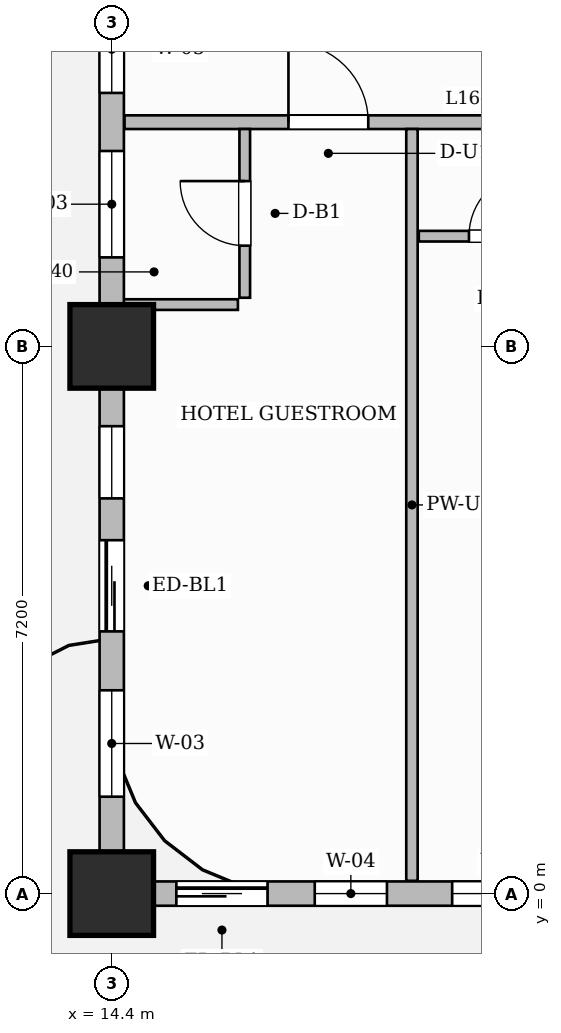
"""IFC4 building model, lengths in metres.
Left out: names, types, materials, properties, quantities, classifications, styles, units other than length and angle.
Written with IfcOpenShell. Run it as: python <this file> out.ifc"""

import sys

from ifc_helpers import new_model, si_unit, direction, frame, frame_2d, origin, origin_2d, place, context, subcontext, project, spatial, rectangle, extrude, source, transform, mapped, element, fill, save


model = new_model("IFC4")
c1 = context("Model", 3, precision=1e-05, world=origin(), true_north=direction((0.0, 1.0)))
c2 = subcontext(c1, "Body", "Model", "MODEL_VIEW")
j1 = project(units=[si_unit("LENGTHUNIT", "METRE"), si_unit("PLANEANGLEUNIT", "RADIAN")], contexts=[c1])
p1 = place(None, origin())
s1 = spatial("IfcSite", under=j1, at=p1, CompositionType="ELEMENT")
p2 = place(p1, origin())
s2 = spatial("IfcBuilding", under=s1, at=p2, CompositionType="ELEMENT")
p3 = place(p2, frame((0.0, 0.0, 69.4)))
s3 = spatial("IfcBuildingStorey", under=s2, at=p3, CompositionType="ELEMENT", Elevation=69.4)
m1 = source(origin(), c2, "Body", "SweptSolid", [
    extrude(rectangle(XDim=1.1, YDim=1.1, at=origin_2d()), origin(), (0.0, 0.0, 1.0), 3.7),
])
for number, where, z_axis, x_axis in (
    (1, (14.4, 0.0, 0.0), (0.0, 0.0, 1.0), (1.0, 0.0, 0.0)),
    (2, (14.4, 7.2, 0.0), (0.0, 0.0, 1.0), (1.0, 0.0, 0.0)),
):
    element("IfcColumn", number, at=place(p3, frame(where, z_axis=z_axis, x_axis=x_axis)), inside=s3, PredefinedType="COLUMN", context=c2, shape_type="MappedRepresentation", body=[
        mapped(m1, transform((0.0, 0.0, 0.0), scale=1.0)),
    ])
p4 = place(p3, frame((14.568, 10.15, 0.0), z_axis=(0.0, 0.0, 1.0), x_axis=(1.0, 0.0, 0.0)))
e3 = element("IfcWall", 3, at=p4, inside=s3, PredefinedType="PARTITIONING", context=c2, shape_type="SweptSolid", body=[
    extrude(rectangle(XDim=15.542, YDim=0.18, at=frame_2d((7.771, 0.0))), origin(), (0.0, 0.0, 1.0), 3.45),
])
p5 = place(p4, frame((2.157, 0.0, 0.0)))
e4 = element("IfcOpeningElement", 4, at=p5, cuts=e3, PredefinedType="OPENING", context=c2, shape_type="SweptSolid", body=[
    extrude(rectangle(XDim=1.05, YDim=2.25, at=frame_2d((0.525, 1.125))), frame((0.0, 0.1, 0.0), z_axis=(0.0, -1.0, 0.0), x_axis=(1.0, 0.0, 0.0)), (0.0, 0.0, 1.0), 0.2),
])
p6 = place(p4, frame((7.142, 0.0, 0.0)))
e5 = element("IfcOpeningElement", 5, at=p6, cuts=e3, PredefinedType="OPENING", context=c2, shape_type="SweptSolid", body=[
    extrude(rectangle(XDim=1.0, YDim=2.2, at=frame_2d((0.5, 1.1))), frame((0.0, 0.1, 0.0), z_axis=(0.0, -1.0, 0.0), x_axis=(1.0, 0.0, 0.0)), (0.0, 0.0, 1.0), 0.2),
])
p7 = place(p4, frame((10.987, 0.0, 0.0)))
e6 = element("IfcOpeningElement", 6, at=p7, cuts=e3, PredefinedType="OPENING", context=c2, shape_type="SweptSolid", body=[
    extrude(rectangle(XDim=1.05, YDim=2.25, at=frame_2d((0.525, 1.125))), frame((0.0, 0.1, 0.0), z_axis=(0.0, -1.0, 0.0), x_axis=(1.0, 0.0, 0.0)), (0.0, 0.0, 1.0), 0.2),
])
p8 = place(p4, frame((14.402, 0.0, 0.0)))
e7 = element("IfcOpeningElement", 7, at=p8, cuts=e3, PredefinedType="OPENING", context=c2, shape_type="SweptSolid", body=[
    extrude(rectangle(XDim=1.0, YDim=2.2, at=frame_2d((0.5, 1.1))), frame((0.0, 0.1, 0.0), z_axis=(0.0, -1.0, 0.0), x_axis=(1.0, 0.0, 0.0)), (0.0, 0.0, 1.0), 0.2),
])
p9 = place(p3, frame((16.15, 7.84, 0.0), z_axis=(0.0, 0.0, 1.0), x_axis=(0.0, 1.0, 0.0)))
e8 = element("IfcWall", 8, at=p9, inside=s3, PredefinedType="PARTITIONING", context=c2, shape_type="SweptSolid", body=[
    extrude(rectangle(XDim=2.22, YDim=0.14, at=frame_2d((1.11, 0.0))), origin(), (0.0, 0.0, 1.0), 3.45),
])
p10 = place(p9, frame((0.685, 0.0, 0.0)))
e9 = element("IfcOpeningElement", 9, at=p10, cuts=e8, PredefinedType="OPENING", context=c2, shape_type="SweptSolid", body=[
    extrude(rectangle(XDim=0.85, YDim=2.1, at=frame_2d((0.425, 1.05))), frame((0.0, 0.08, 0.0), z_axis=(0.0, -1.0, 0.0), x_axis=(1.0, 0.0, 0.0)), (0.0, 0.0, 1.0), 0.16),
])
p11 = place(p3, frame((14.49, 7.75, 0.0), z_axis=(0.0, 0.0, 1.0), x_axis=(1.0, 0.0, 0.0)))
e10 = element("IfcWall", 10, at=p11, inside=s3, PredefinedType="PARTITIONING", context=c2, shape_type="SweptSolid", body=[
    extrude(rectangle(XDim=1.57, YDim=0.14, at=frame_2d((0.785, 0.0))), origin(), (0.0, 0.0, 1.0), 3.45),
])
p12 = place(p3, frame((18.35, 0.168, 0.0), z_axis=(0.0, 0.0, 1.0), x_axis=(0.0, 1.0, 0.0)))
e11 = element("IfcWall", 11, at=p12, inside=s3, PredefinedType="PARTITIONING", context=c2, shape_type="SweptSolid", body=[
    extrude(rectangle(XDim=9.892, YDim=0.15, at=frame_2d((4.946, 0.0))), origin(), (0.0, 0.0, 1.0), 3.45),
])
p13 = place(p3, frame((18.44, 8.65, 0.0), z_axis=(0.0, 0.0, 1.0), x_axis=(1.0, 0.0, 0.0)))
e12 = element("IfcWall", 12, at=p13, inside=s3, PredefinedType="PARTITIONING", context=c2, shape_type="SweptSolid", body=[
    extrude(rectangle(XDim=2.17, YDim=0.14, at=frame_2d((1.085, 0.0))), origin(), (0.0, 0.0, 1.0), 3.45),
])
p14 = place(p13, frame((0.66, 0.0, 0.0)))
e13 = element("IfcOpeningElement", 13, at=p14, cuts=e12, PredefinedType="OPENING", context=c2, shape_type="SweptSolid", body=[
    extrude(rectangle(XDim=0.85, YDim=2.1, at=frame_2d((0.425, 1.05))), frame((0.0, 0.08, 0.0), z_axis=(0.0, -1.0, 0.0), x_axis=(1.0, 0.0, 0.0)), (0.0, 0.0, 1.0), 0.16),
])
p15 = place(p3, frame((14.4, 0.0, 0.0), z_axis=(0.0, 0.0, 1.0), x_axis=(1.0, 0.0, 0.0)))
e14 = element("IfcWall", 14, at=p15, inside=s3, PredefinedType="SOLIDWALL", context=c2, shape_type="SweptSolid", body=[
    extrude(rectangle(XDim=43.2, YDim=0.32, at=frame_2d((21.6, 0.0))), origin(), (0.0, 0.0, 1.0), 2.885),
])
p16 = place(p15, frame((0.85, 0.0, 0.0)))
e15 = element("IfcOpeningElement", 15, at=p16, cuts=e14, PredefinedType="OPENING", context=c2, shape_type="SweptSolid", body=[
    extrude(rectangle(XDim=1.2, YDim=2.2, at=frame_2d((0.6, 1.1))), frame((0.0, 0.17, 0.0), z_axis=(0.0, -1.0, 0.0), x_axis=(1.0, 0.0, 0.0)), (0.0, 0.0, 1.0), 0.34),
])
p17 = place(p15, frame((2.671, 0.0, 0.8)))
e16 = element("IfcOpeningElement", 16, at=p17, cuts=e14, PredefinedType="OPENING", context=c2, shape_type="SweptSolid", body=[
    extrude(rectangle(XDim=0.95, YDim=1.75, at=frame_2d((0.475, 0.875))), frame((0.0, 0.17, 0.0), z_axis=(0.0, -1.0, 0.0), x_axis=(1.0, 0.0, 0.0)), (0.0, 0.0, 1.0), 0.34),
])
p18 = place(p15, frame((4.479, 0.0, 0.8)))
e17 = element("IfcOpeningElement", 17, at=p18, cuts=e14, PredefinedType="OPENING", context=c2, shape_type="SweptSolid", body=[
    extrude(rectangle(XDim=1.4, YDim=1.85, at=frame_2d((0.7, 0.925))), frame((0.0, 0.17, 0.0), z_axis=(0.0, -1.0, 0.0), x_axis=(1.0, 0.0, 0.0)), (0.0, 0.0, 1.0), 0.34),
])
p19 = place(p15, frame((8.181, 0.0, 0.8)))
e18 = element("IfcOpeningElement", 18, at=p19, cuts=e14, PredefinedType="OPENING", context=c2, shape_type="SweptSolid", body=[
    extrude(rectangle(XDim=0.95, YDim=1.75, at=frame_2d((0.475, 0.875))), frame((0.0, 0.17, 0.0), z_axis=(0.0, -1.0, 0.0), x_axis=(1.0, 0.0, 0.0)), (0.0, 0.0, 1.0), 0.34),
])
p20 = place(p15, frame((9.845, 0.0, 0.8)))
e19 = element("IfcOpeningElement", 19, at=p20, cuts=e14, PredefinedType="OPENING", context=c2, shape_type="SweptSolid", body=[
    extrude(rectangle(XDim=1.8, YDim=1.85, at=frame_2d((0.9, 0.925))), frame((0.0, 0.17, 0.0), z_axis=(0.0, -1.0, 0.0), x_axis=(1.0, 0.0, 0.0)), (0.0, 0.0, 1.0), 0.34),
])
p21 = place(p15, frame((12.414, 0.0, 0.8)))
e20 = element("IfcOpeningElement", 20, at=p21, cuts=e14, PredefinedType="OPENING", context=c2, shape_type="SweptSolid", body=[
    extrude(rectangle(XDim=0.95, YDim=1.75, at=frame_2d((0.475, 0.875))), frame((0.0, 0.17, 0.0), z_axis=(0.0, -1.0, 0.0), x_axis=(1.0, 0.0, 0.0)), (0.0, 0.0, 1.0), 0.34),
])
p22 = place(p15, frame((16.804, 0.0, 0.8)))
e21 = element("IfcOpeningElement", 21, at=p22, cuts=e14, PredefinedType="OPENING", context=c2, shape_type="SweptSolid", body=[
    extrude(rectangle(XDim=1.8, YDim=1.85, at=frame_2d((0.9, 0.925))), frame((0.0, 0.17, 0.0), z_axis=(0.0, -1.0, 0.0), x_axis=(1.0, 0.0, 0.0)), (0.0, 0.0, 1.0), 0.34),
])
p23 = place(p15, frame((22.396, 0.0, 0.8)))
e22 = element("IfcOpeningElement", 22, at=p23, cuts=e14, PredefinedType="OPENING", context=c2, shape_type="SweptSolid", body=[
    extrude(rectangle(XDim=1.8, YDim=1.85, at=frame_2d((0.9, 0.925))), frame((0.0, 0.17, 0.0), z_axis=(0.0, -1.0, 0.0), x_axis=(1.0, 0.0, 0.0)), (0.0, 0.0, 1.0), 0.34),
])
p24 = place(p15, frame((25.629, 0.0, 0.8)))
e23 = element("IfcOpeningElement", 23, at=p24, cuts=e14, PredefinedType="OPENING", context=c2, shape_type="SweptSolid", body=[
    extrude(rectangle(XDim=0.95, YDim=1.75, at=frame_2d((0.475, 0.875))), frame((0.0, 0.17, 0.0), z_axis=(0.0, -1.0, 0.0), x_axis=(1.0, 0.0, 0.0)), (0.0, 0.0, 1.0), 0.34),
])
p25 = place(p15, frame((29.075, 0.0, 0.8)))
e24 = element("IfcOpeningElement", 24, at=p25, cuts=e14, PredefinedType="OPENING", context=c2, shape_type="SweptSolid", body=[
    extrude(rectangle(XDim=1.8, YDim=1.85, at=frame_2d((0.9, 0.925))), frame((0.0, 0.17, 0.0), z_axis=(0.0, -1.0, 0.0), x_axis=(1.0, 0.0, 0.0)), (0.0, 0.0, 1.0), 0.34),
])
p26 = place(p15, frame((32.125, 0.0, 0.8)))
e25 = element("IfcOpeningElement", 25, at=p26, cuts=e14, PredefinedType="OPENING", context=c2, shape_type="SweptSolid", body=[
    extrude(rectangle(XDim=1.8, YDim=1.85, at=frame_2d((0.9, 0.925))), frame((0.0, 0.17, 0.0), z_axis=(0.0, -1.0, 0.0), x_axis=(1.0, 0.0, 0.0)), (0.0, 0.0, 1.0), 0.34),
])
p27 = place(p15, frame((36.946, 0.0, 0.8)))
e26 = element("IfcOpeningElement", 26, at=p27, cuts=e14, PredefinedType="OPENING", context=c2, shape_type="SweptSolid", body=[
    extrude(rectangle(XDim=1.8, YDim=1.85, at=frame_2d((0.9, 0.925))), frame((0.0, 0.17, 0.0), z_axis=(0.0, -1.0, 0.0), x_axis=(1.0, 0.0, 0.0)), (0.0, 0.0, 1.0), 0.34),
])
p28 = place(p15, frame((40.054, 0.0, 0.8)))
e27 = element("IfcOpeningElement", 27, at=p28, cuts=e14, PredefinedType="OPENING", context=c2, shape_type="SweptSolid", body=[
    extrude(rectangle(XDim=1.8, YDim=1.85, at=frame_2d((0.9, 0.925))), frame((0.0, 0.17, 0.0), z_axis=(0.0, -1.0, 0.0), x_axis=(1.0, 0.0, 0.0)), (0.0, 0.0, 1.0), 0.34),
])
p29 = place(p3, frame((14.4, 0.05, 0.0), z_axis=(0.0, 0.0, 1.0), x_axis=(0.0, 1.0, 0.0)))
e28 = element("IfcWall", 28, at=p29, inside=s3, PredefinedType="SOLIDWALL", context=c2, shape_type="SweptSolid", body=[
    extrude(rectangle(XDim=20.6, YDim=0.32, at=frame_2d((10.3, 0.0))), origin(), (0.0, 0.0, 1.0), 2.885),
])
p30 = place(p29, frame((3.4, 0.0, 0.0)))
e29 = element("IfcOpeningElement", 29, at=p30, cuts=e28, PredefinedType="OPENING", context=c2, shape_type="SweptSolid", body=[
    extrude(rectangle(XDim=1.2, YDim=2.2, at=frame_2d((0.6, 1.1))), frame((0.0, 0.17, 0.0), z_axis=(0.0, -1.0, 0.0), x_axis=(1.0, 0.0, 0.0)), (0.0, 0.0, 1.0), 0.34),
])
p31 = place(p29, frame((1.225, 0.0, 0.8)))
e30 = element("IfcOpeningElement", 30, at=p31, cuts=e28, PredefinedType="OPENING", context=c2, shape_type="SweptSolid", body=[
    extrude(rectangle(XDim=1.4, YDim=1.85, at=frame_2d((0.7, 0.925))), frame((0.0, 0.17, 0.0), z_axis=(0.0, -1.0, 0.0), x_axis=(1.0, 0.0, 0.0)), (0.0, 0.0, 1.0), 0.34),
])
p32 = place(p29, frame((5.15, 0.0, 0.8)))
e31 = element("IfcOpeningElement", 31, at=p32, cuts=e28, PredefinedType="OPENING", context=c2, shape_type="SweptSolid", body=[
    extrude(rectangle(XDim=0.95, YDim=1.75, at=frame_2d((0.475, 0.875))), frame((0.0, 0.17, 0.0), z_axis=(0.0, -1.0, 0.0), x_axis=(1.0, 0.0, 0.0)), (0.0, 0.0, 1.0), 0.34),
])
p33 = place(p29, frame((8.321, 0.0, 0.8)))
e32 = element("IfcOpeningElement", 32, at=p33, cuts=e28, PredefinedType="OPENING", context=c2, shape_type="SweptSolid", body=[
    extrude(rectangle(XDim=1.4, YDim=1.85, at=frame_2d((0.7, 0.925))), frame((0.0, 0.17, 0.0), z_axis=(0.0, -1.0, 0.0), x_axis=(1.0, 0.0, 0.0)), (0.0, 0.0, 1.0), 0.34),
])
p34 = place(p29, frame((10.485, 0.0, 0.8)))
e33 = element("IfcOpeningElement", 33, at=p34, cuts=e28, PredefinedType="OPENING", context=c2, shape_type="SweptSolid", body=[
    extrude(rectangle(XDim=1.15, YDim=1.8, at=frame_2d((0.575, 0.9))), frame((0.0, 0.17, 0.0), z_axis=(0.0, -1.0, 0.0), x_axis=(1.0, 0.0, 0.0)), (0.0, 0.0, 1.0), 0.34),
])
p35 = place(p29, frame((12.314, 0.0, 0.8)))
e34 = element("IfcOpeningElement", 34, at=p35, cuts=e28, PredefinedType="OPENING", context=c2, shape_type="SweptSolid", body=[
    extrude(rectangle(XDim=0.95, YDim=1.75, at=frame_2d((0.475, 0.875))), frame((0.0, 0.17, 0.0), z_axis=(0.0, -1.0, 0.0), x_axis=(1.0, 0.0, 0.0)), (0.0, 0.0, 1.0), 0.34),
])
p36 = place(p29, frame((16.79, 0.0, 0.8)))
e35 = element("IfcOpeningElement", 35, at=p36, cuts=e28, PredefinedType="OPENING", context=c2, shape_type="SweptSolid", body=[
    extrude(rectangle(XDim=1.8, YDim=1.85, at=frame_2d((0.9, 0.925))), frame((0.0, 0.17, 0.0), z_axis=(0.0, -1.0, 0.0), x_axis=(1.0, 0.0, 0.0)), (0.0, 0.0, 1.0), 0.34),
])
m2 = source(origin(), c2, "Body", "SweptSolid", [
    extrude(rectangle(XDim=0.85, YDim=2.1, at=frame_2d((0.425, 1.05))), frame((0.0, 0.025, 0.0), z_axis=(0.0, -1.0, 0.0), x_axis=(1.0, 0.0, 0.0)), (0.0, 0.0, 1.0), 0.05),
])
p37 = place(p10, origin())
e36 = element("IfcDoor", 36, at=p37, inside=s3, OperationType="SINGLE_SWING_RIGHT", PredefinedType="DOOR", context=c2, shape_type="MappedRepresentation", body=[
    mapped(m2, transform((0.0, 0.0, 0.0), scale=1.0)),
])
fill(e9, e36)
m3 = source(origin(), c2, "Body", "SweptSolid", [
    extrude(rectangle(XDim=1.05, YDim=2.25, at=frame_2d((0.525, 1.125))), frame((0.0, 0.025, 0.0), z_axis=(0.0, -1.0, 0.0), x_axis=(1.0, 0.0, 0.0)), (0.0, 0.0, 1.0), 0.05),
])
p38 = place(p5, origin())
e37 = element("IfcDoor", 37, at=p38, inside=s3, OperationType="SINGLE_SWING_LEFT", PredefinedType="DOOR", context=c2, shape_type="MappedRepresentation", body=[
    mapped(m3, transform((0.0, 0.0, 0.0), scale=1.0)),
])
fill(e4, e37)
p39 = place(p14, origin())
e38 = element("IfcDoor", 38, at=p39, inside=s3, OperationType="SINGLE_SWING_RIGHT", PredefinedType="DOOR", context=c2, shape_type="MappedRepresentation", body=[
    mapped(m2, transform((0.0, 0.0, 0.0), scale=1.0)),
])
fill(e13, e38)
m4 = source(origin(), c2, "Body", "SweptSolid", [
    extrude(rectangle(XDim=1.2, YDim=2.2, at=frame_2d((0.6, 1.1))), frame((0.0, 0.025, 0.0), z_axis=(0.0, -1.0, 0.0), x_axis=(1.0, 0.0, 0.0)), (0.0, 0.0, 1.0), 0.05),
])
p40 = place(p16, origin())
e39 = element("IfcDoor", 39, at=p40, inside=s3, OperationType="SLIDING_TO_LEFT", PredefinedType="DOOR", context=c2, shape_type="MappedRepresentation", body=[
    mapped(m4, transform((0.0, 0.0, 0.0), scale=1.0)),
])
fill(e15, e39)
p41 = place(p30, origin())
e40 = element("IfcDoor", 40, at=p41, inside=s3, OperationType="SLIDING_TO_LEFT", PredefinedType="DOOR", context=c2, shape_type="MappedRepresentation", body=[
    mapped(m4, transform((0.0, 0.0, 0.0), scale=1.0)),
])
fill(e29, e40)
m5 = source(origin(), c2, "Body", "SweptSolid", [
    extrude(rectangle(XDim=0.95, YDim=1.75, at=frame_2d((0.475, 0.875))), frame((0.0, 0.03, 0.0), z_axis=(0.0, -1.0, 0.0), x_axis=(1.0, 0.0, 0.0)), (0.0, 0.0, 1.0), 0.06),
])
p42 = place(p17, origin())
e41 = element("IfcWindow", 41, at=p42, inside=s3, PartitioningType="SINGLE_PANEL", PredefinedType="WINDOW", context=c2, shape_type="MappedRepresentation", body=[
    mapped(m5, transform((0.0, 0.0, 0.0), scale=1.0)),
])
fill(e16, e41)
m6 = source(origin(), c2, "Body", "SweptSolid", [
    extrude(rectangle(XDim=1.4, YDim=1.85, at=frame_2d((0.7, 0.925))), frame((0.0, 0.03, 0.0), z_axis=(0.0, -1.0, 0.0), x_axis=(1.0, 0.0, 0.0)), (0.0, 0.0, 1.0), 0.06),
])
p43 = place(p18, origin())
e42 = element("IfcWindow", 42, at=p43, inside=s3, PartitioningType="SINGLE_PANEL", PredefinedType="WINDOW", context=c2, shape_type="MappedRepresentation", body=[
    mapped(m6, transform((0.0, 0.0, 0.0), scale=1.0)),
])
fill(e17, e42)
p44 = place(p31, origin())
e43 = element("IfcWindow", 43, at=p44, inside=s3, PartitioningType="SINGLE_PANEL", PredefinedType="WINDOW", context=c2, shape_type="MappedRepresentation", body=[
    mapped(m6, transform((0.0, 0.0, 0.0), scale=1.0)),
])
fill(e30, e43)
p45 = place(p32, origin())
e44 = element("IfcWindow", 44, at=p45, inside=s3, PartitioningType="SINGLE_PANEL", PredefinedType="WINDOW", context=c2, shape_type="MappedRepresentation", body=[
    mapped(m5, transform((0.0, 0.0, 0.0), scale=1.0)),
])
fill(e31, e44)
p46 = place(p33, origin())
e45 = element("IfcWindow", 45, at=p46, inside=s3, PartitioningType="SINGLE_PANEL", PredefinedType="WINDOW", context=c2, shape_type="MappedRepresentation", body=[
    mapped(m6, transform((0.0, 0.0, 0.0), scale=1.0)),
])
fill(e32, e45)
m7 = source(origin(), c2, "Body", "SweptSolid", [
    extrude(rectangle(XDim=1.15, YDim=1.8, at=frame_2d((0.575, 0.9))), frame((0.0, 0.03, 0.0), z_axis=(0.0, -1.0, 0.0), x_axis=(1.0, 0.0, 0.0)), (0.0, 0.0, 1.0), 0.06),
])
p47 = place(p34, origin())
e46 = element("IfcWindow", 46, at=p47, inside=s3, PartitioningType="SINGLE_PANEL", PredefinedType="WINDOW", context=c2, shape_type="MappedRepresentation", body=[
    mapped(m7, transform((0.0, 0.0, 0.0), scale=1.0)),
])
fill(e33, e46)
save(model, sys.argv[1])
